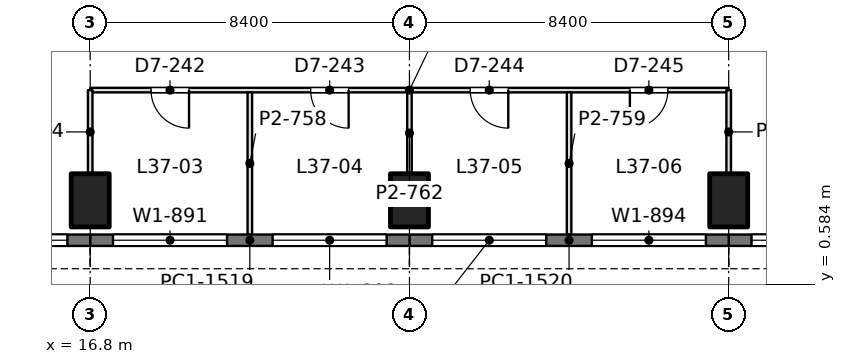
"""IFC4 building model, lengths in metres.
Left out: names, types, materials, properties, quantities, classifications, styles, units other than length and angle.
Written with IfcOpenShell. Run it as: python <this file> out.ifc"""

import sys

from ifc_helpers import new_model, si_unit, direction, frame, frame_2d, origin, origin_2d, place, context, subcontext, project, spatial, rectangle, extrude, element, fill, save


model = new_model("IFC4")
c1 = context("Model", 3, precision=1e-05, world=origin(), true_north=direction((0.0, 1.0)))
c2 = subcontext(c1, "Body", "Model", "MODEL_VIEW")
j1 = project(units=[si_unit("LENGTHUNIT", "METRE"), si_unit("PLANEANGLEUNIT", "RADIAN")], contexts=[c1])
p1 = place(None, origin())
s1 = spatial("IfcSite", under=j1, at=p1, CompositionType="ELEMENT")
p2 = place(p1, origin())
s2 = spatial("IfcBuilding", under=s1, at=p2, CompositionType="ELEMENT")
p3 = place(p2, frame((0.0, 0.0, 163.8)))
s3 = spatial("IfcBuildingStorey", under=s2, at=p3, CompositionType="ELEMENT", Elevation=163.8)
for number, where, z_axis, x_axis in (
    (1, (16.8, 2.8, 0.0), (0.0, 0.0, 1.0), (1.0, 0.0, 0.0)),
    (2, (25.2, 2.8, 0.0), (0.0, 0.0, 1.0), (1.0, 0.0, 0.0)),
    (3, (33.6, 2.8, 0.0), (0.0, 0.0, 1.0), (1.0, 0.0, 0.0)),
):
    element("IfcColumn", number, at=place(p3, frame(where, z_axis=z_axis, x_axis=x_axis)), inside=s3, PredefinedType="COLUMN", context=c2, shape_type="SweptSolid", body=[
        extrude(rectangle(XDim=1.0, YDim=1.4, at=origin_2d()), origin(), (0.0, 0.0, 1.0), 4.2),
    ])
p4 = place(p3, frame((42.0, 1.75, 0.0), z_axis=(0.0, 0.0, 1.0), x_axis=(-1.0, 0.0, 0.0)))
e4 = element("IfcWall", 4, at=p4, inside=s3, PredefinedType="SOLIDWALL", context=c2, shape_type="SweptSolid", body=[
    extrude(rectangle(XDim=8.4, YDim=0.3, at=frame_2d((4.2, 0.0))), origin(), (0.0, 0.0, 1.0), 4.0),
])
p5 = place(p4, frame((0.6, 0.0, 0.9)))
e5 = element("IfcOpeningElement", 5, at=p5, cuts=e4, PredefinedType="OPENING", context=c2, shape_type="SweptSolid", body=[
    extrude(rectangle(XDim=3.0, YDim=1.9, at=frame_2d((1.5, 0.95))), frame((0.0, 0.16, 0.0), z_axis=(0.0, -1.0, 0.0), x_axis=(1.0, 0.0, 0.0)), (0.0, 0.0, 1.0), 0.32),
])
p6 = place(p4, frame((4.8, 0.0, 0.9)))
e6 = element("IfcOpeningElement", 6, at=p6, cuts=e4, PredefinedType="OPENING", context=c2, shape_type="SweptSolid", body=[
    extrude(rectangle(XDim=3.0, YDim=1.9, at=frame_2d((1.5, 0.95))), frame((0.0, 0.16, 0.0), z_axis=(0.0, -1.0, 0.0), x_axis=(1.0, 0.0, 0.0)), (0.0, 0.0, 1.0), 0.32),
])
p7 = place(p3, frame((33.6, 1.75, 0.0), z_axis=(0.0, 0.0, 1.0), x_axis=(-1.0, 0.0, 0.0)))
e7 = element("IfcWall", 7, at=p7, inside=s3, PredefinedType="SOLIDWALL", context=c2, shape_type="SweptSolid", body=[
    extrude(rectangle(XDim=8.4, YDim=0.3, at=frame_2d((4.2, 0.0))), origin(), (0.0, 0.0, 1.0), 4.0),
])
p8 = place(p7, frame((0.6, 0.0, 0.9)))
e8 = element("IfcOpeningElement", 8, at=p8, cuts=e7, PredefinedType="OPENING", context=c2, shape_type="SweptSolid", body=[
    extrude(rectangle(XDim=3.0, YDim=1.9, at=frame_2d((1.5, 0.95))), frame((0.0, 0.16, 0.0), z_axis=(0.0, -1.0, 0.0), x_axis=(1.0, 0.0, 0.0)), (0.0, 0.0, 1.0), 0.32),
])
p9 = place(p7, frame((4.8, 0.0, 0.9)))
e9 = element("IfcOpeningElement", 9, at=p9, cuts=e7, PredefinedType="OPENING", context=c2, shape_type="SweptSolid", body=[
    extrude(rectangle(XDim=3.0, YDim=1.9, at=frame_2d((1.5, 0.95))), frame((0.0, 0.16, 0.0), z_axis=(0.0, -1.0, 0.0), x_axis=(1.0, 0.0, 0.0)), (0.0, 0.0, 1.0), 0.32),
])
p10 = place(p3, frame((25.2, 1.75, 0.0), z_axis=(0.0, 0.0, 1.0), x_axis=(-1.0, 0.0, 0.0)))
e10 = element("IfcWall", 10, at=p10, inside=s3, PredefinedType="SOLIDWALL", context=c2, shape_type="SweptSolid", body=[
    extrude(rectangle(XDim=8.4, YDim=0.3, at=frame_2d((4.2, 0.0))), origin(), (0.0, 0.0, 1.0), 4.0),
])
p11 = place(p10, frame((0.6, 0.0, 0.9)))
e11 = element("IfcOpeningElement", 11, at=p11, cuts=e10, PredefinedType="OPENING", context=c2, shape_type="SweptSolid", body=[
    extrude(rectangle(XDim=3.0, YDim=1.9, at=frame_2d((1.5, 0.95))), frame((0.0, 0.16, 0.0), z_axis=(0.0, -1.0, 0.0), x_axis=(1.0, 0.0, 0.0)), (0.0, 0.0, 1.0), 0.32),
])
p12 = place(p10, frame((4.8, 0.0, 0.9)))
e12 = element("IfcOpeningElement", 12, at=p12, cuts=e10, PredefinedType="OPENING", context=c2, shape_type="SweptSolid", body=[
    extrude(rectangle(XDim=3.0, YDim=1.9, at=frame_2d((1.5, 0.95))), frame((0.0, 0.16, 0.0), z_axis=(0.0, -1.0, 0.0), x_axis=(1.0, 0.0, 0.0)), (0.0, 0.0, 1.0), 0.32),
])
p13 = place(p3, frame((16.8, 1.75, 0.0), z_axis=(0.0, 0.0, 1.0), x_axis=(-1.0, 0.0, 0.0)))
e13 = element("IfcWall", 13, at=p13, inside=s3, PredefinedType="SOLIDWALL", context=c2, shape_type="SweptSolid", body=[
    extrude(rectangle(XDim=8.4, YDim=0.3, at=frame_2d((4.2, 0.0))), origin(), (0.0, 0.0, 1.0), 4.0),
])
p14 = place(p13, frame((0.6, 0.0, 0.9)))
e14 = element("IfcOpeningElement", 14, at=p14, cuts=e13, PredefinedType="OPENING", context=c2, shape_type="SweptSolid", body=[
    extrude(rectangle(XDim=3.0, YDim=1.9, at=frame_2d((1.5, 0.95))), frame((0.0, 0.16, 0.0), z_axis=(0.0, -1.0, 0.0), x_axis=(1.0, 0.0, 0.0)), (0.0, 0.0, 1.0), 0.32),
])
p15 = place(p13, frame((4.8, 0.0, 0.9)))
e15 = element("IfcOpeningElement", 15, at=p15, cuts=e13, PredefinedType="OPENING", context=c2, shape_type="SweptSolid", body=[
    extrude(rectangle(XDim=3.0, YDim=1.9, at=frame_2d((1.5, 0.95))), frame((0.0, 0.16, 0.0), z_axis=(0.0, -1.0, 0.0), x_axis=(1.0, 0.0, 0.0)), (0.0, 0.0, 1.0), 0.32),
])
p16 = place(p3, frame((16.8, 5.7, 0.0), z_axis=(0.0, 0.0, 1.0), x_axis=(1.0, 0.0, 0.0)))
e16 = element("IfcWall", 16, at=p16, inside=s3, PredefinedType="PARTITIONING", context=c2, shape_type="SweptSolid", body=[
    extrude(rectangle(XDim=16.8, YDim=0.12, at=frame_2d((8.4, 0.0))), origin(), (0.0, 0.0, 1.0), 3.3),
])
p17 = place(p16, frame((1.6, 0.0, 0.0)))
e17 = element("IfcOpeningElement", 17, at=p17, cuts=e16, PredefinedType="OPENING", context=c2, shape_type="SweptSolid", body=[
    extrude(rectangle(XDim=1.0, YDim=2.4, at=frame_2d((0.5, 1.2))), frame((0.0, 0.07, 0.0), z_axis=(0.0, -1.0, 0.0), x_axis=(1.0, 0.0, 0.0)), (0.0, 0.0, 1.0), 0.14),
])
p18 = place(p16, frame((5.8, 0.0, 0.0)))
e18 = element("IfcOpeningElement", 18, at=p18, cuts=e16, PredefinedType="OPENING", context=c2, shape_type="SweptSolid", body=[
    extrude(rectangle(XDim=1.0, YDim=2.4, at=frame_2d((0.5, 1.2))), frame((0.0, 0.07, 0.0), z_axis=(0.0, -1.0, 0.0), x_axis=(1.0, 0.0, 0.0)), (0.0, 0.0, 1.0), 0.14),
])
p19 = place(p16, frame((10.0, 0.0, 0.0)))
e19 = element("IfcOpeningElement", 19, at=p19, cuts=e16, PredefinedType="OPENING", context=c2, shape_type="SweptSolid", body=[
    extrude(rectangle(XDim=1.0, YDim=2.4, at=frame_2d((0.5, 1.2))), frame((0.0, 0.07, 0.0), z_axis=(0.0, -1.0, 0.0), x_axis=(1.0, 0.0, 0.0)), (0.0, 0.0, 1.0), 0.14),
])
p20 = place(p16, frame((14.2, 0.0, 0.0)))
e20 = element("IfcOpeningElement", 20, at=p20, cuts=e16, PredefinedType="OPENING", context=c2, shape_type="SweptSolid", body=[
    extrude(rectangle(XDim=1.0, YDim=2.4, at=frame_2d((0.5, 1.2))), frame((0.0, 0.07, 0.0), z_axis=(0.0, -1.0, 0.0), x_axis=(1.0, 0.0, 0.0)), (0.0, 0.0, 1.0), 0.14),
])
p21 = place(p3, frame((16.8, 3.499, 0.0), z_axis=(0.0, 0.0, 1.0), x_axis=(0.0, 1.0, 0.0)))
e21 = element("IfcWall", 21, at=p21, inside=s3, PredefinedType="PARTITIONING", context=c2, shape_type="SweptSolid", body=[
    extrude(rectangle(XDim=2.201, YDim=0.12, at=frame_2d((1.101, 0.0))), origin(), (0.0, 0.0, 1.0), 3.3),
])
p22 = place(p3, frame((21.0, 1.898, 0.0), z_axis=(0.0, 0.0, 1.0), x_axis=(0.0, 1.0, 0.0)))
e22 = element("IfcWall", 22, at=p22, inside=s3, PredefinedType="PARTITIONING", context=c2, shape_type="SweptSolid", body=[
    extrude(rectangle(XDim=3.744, YDim=0.12, at=frame_2d((1.872, 0.0))), origin(), (0.0, 0.0, 1.0), 3.593),
])
p23 = place(p3, frame((25.2, 3.499, 0.0), z_axis=(0.0, 0.0, 1.0), x_axis=(0.0, 1.0, 0.0)))
e23 = element("IfcWall", 23, at=p23, inside=s3, PredefinedType="PARTITIONING", context=c2, shape_type="SweptSolid", body=[
    extrude(rectangle(XDim=2.143, YDim=0.12, at=frame_2d((1.072, 0.0))), origin(), (0.0, 0.0, 1.0), 3.3),
])
p24 = place(p3, frame((29.4, 1.898, 0.0), z_axis=(0.0, 0.0, 1.0), x_axis=(0.0, 1.0, 0.0)))
e24 = element("IfcWall", 24, at=p24, inside=s3, PredefinedType="PARTITIONING", context=c2, shape_type="SweptSolid", body=[
    extrude(rectangle(XDim=3.744, YDim=0.12, at=frame_2d((1.872, 0.0))), origin(), (0.0, 0.0, 1.0), 3.593),
])
p25 = place(p3, frame((33.6, 3.499, 0.0), z_axis=(0.0, 0.0, 1.0), x_axis=(0.0, 1.0, 0.0)))
e25 = element("IfcWall", 25, at=p25, inside=s3, PredefinedType="PARTITIONING", context=c2, shape_type="SweptSolid", body=[
    extrude(rectangle(XDim=2.201, YDim=0.12, at=frame_2d((1.101, 0.0))), origin(), (0.0, 0.0, 1.0), 3.3),
])
p26 = place(p6, origin())
e26 = element("IfcWindow", 26, at=p26, inside=s3, PartitioningType="SINGLE_PANEL", PredefinedType="WINDOW", context=c2, shape_type="SweptSolid", body=[
    extrude(rectangle(XDim=3.0, YDim=1.9, at=frame_2d((1.5, 0.95))), frame((0.0, 0.03, 0.0), z_axis=(0.0, -1.0, 0.0), x_axis=(1.0, 0.0, 0.0)), (0.0, 0.0, 1.0), 0.06),
])
fill(e6, e26)
p27 = place(p8, origin())
e27 = element("IfcWindow", 27, at=p27, inside=s3, PartitioningType="SINGLE_PANEL", PredefinedType="WINDOW", context=c2, shape_type="SweptSolid", body=[
    extrude(rectangle(XDim=3.0, YDim=1.9, at=frame_2d((1.5, 0.95))), frame((0.0, 0.03, 0.0), z_axis=(0.0, -1.0, 0.0), x_axis=(1.0, 0.0, 0.0)), (0.0, 0.0, 1.0), 0.06),
])
fill(e8, e27)
p28 = place(p9, origin())
e28 = element("IfcWindow", 28, at=p28, inside=s3, PartitioningType="SINGLE_PANEL", PredefinedType="WINDOW", context=c2, shape_type="SweptSolid", body=[
    extrude(rectangle(XDim=3.0, YDim=1.9, at=frame_2d((1.5, 0.95))), frame((0.0, 0.03, 0.0), z_axis=(0.0, -1.0, 0.0), x_axis=(1.0, 0.0, 0.0)), (0.0, 0.0, 1.0), 0.06),
])
fill(e9, e28)
p29 = place(p11, origin())
e29 = element("IfcWindow", 29, at=p29, inside=s3, PartitioningType="SINGLE_PANEL", PredefinedType="WINDOW", context=c2, shape_type="SweptSolid", body=[
    extrude(rectangle(XDim=3.0, YDim=1.9, at=frame_2d((1.5, 0.95))), frame((0.0, 0.03, 0.0), z_axis=(0.0, -1.0, 0.0), x_axis=(1.0, 0.0, 0.0)), (0.0, 0.0, 1.0), 0.06),
])
fill(e11, e29)
p30 = place(p12, origin())
e30 = element("IfcWindow", 30, at=p30, inside=s3, PartitioningType="SINGLE_PANEL", PredefinedType="WINDOW", context=c2, shape_type="SweptSolid", body=[
    extrude(rectangle(XDim=3.0, YDim=1.9, at=frame_2d((1.5, 0.95))), frame((0.0, 0.03, 0.0), z_axis=(0.0, -1.0, 0.0), x_axis=(1.0, 0.0, 0.0)), (0.0, 0.0, 1.0), 0.06),
])
fill(e12, e30)
p31 = place(p14, origin())
e31 = element("IfcWindow", 31, at=p31, inside=s3, PartitioningType="SINGLE_PANEL", PredefinedType="WINDOW", context=c2, shape_type="SweptSolid", body=[
    extrude(rectangle(XDim=3.0, YDim=1.9, at=frame_2d((1.5, 0.95))), frame((0.0, 0.03, 0.0), z_axis=(0.0, -1.0, 0.0), x_axis=(1.0, 0.0, 0.0)), (0.0, 0.0, 1.0), 0.06),
])
fill(e14, e31)
p32 = place(p17, frame((1.0, 0.0, 0.0), z_axis=(0.0, 0.0, 1.0), x_axis=(-1.0, 0.0, 0.0)))
e32 = element("IfcDoor", 32, at=p32, inside=s3, OperationType="SINGLE_SWING_LEFT", PredefinedType="DOOR", context=c2, shape_type="SweptSolid", body=[
    extrude(rectangle(XDim=1.0, YDim=2.4, at=frame_2d((0.5, 1.2))), frame((0.0, 0.025, 0.0), z_axis=(0.0, -1.0, 0.0), x_axis=(1.0, 0.0, 0.0)), (0.0, 0.0, 1.0), 0.05),
])
fill(e17, e32)
p33 = place(p18, frame((1.0, 0.0, 0.0), z_axis=(0.0, 0.0, 1.0), x_axis=(-1.0, 0.0, 0.0)))
e33 = element("IfcDoor", 33, at=p33, inside=s3, OperationType="SINGLE_SWING_LEFT", PredefinedType="DOOR", context=c2, shape_type="SweptSolid", body=[
    extrude(rectangle(XDim=1.0, YDim=2.4, at=frame_2d((0.5, 1.2))), frame((0.0, 0.025, 0.0), z_axis=(0.0, -1.0, 0.0), x_axis=(1.0, 0.0, 0.0)), (0.0, 0.0, 1.0), 0.05),
])
fill(e18, e33)
p34 = place(p19, frame((1.0, 0.0, 0.0), z_axis=(0.0, 0.0, 1.0), x_axis=(-1.0, 0.0, 0.0)))
e34 = element("IfcDoor", 34, at=p34, inside=s3, OperationType="SINGLE_SWING_LEFT", PredefinedType="DOOR", context=c2, shape_type="SweptSolid", body=[
    extrude(rectangle(XDim=1.0, YDim=2.4, at=frame_2d((0.5, 1.2))), frame((0.0, 0.025, 0.0), z_axis=(0.0, -1.0, 0.0), x_axis=(1.0, 0.0, 0.0)), (0.0, 0.0, 1.0), 0.05),
])
fill(e19, e34)
p35 = place(p20, frame((1.0, 0.0, 0.0), z_axis=(0.0, 0.0, 1.0), x_axis=(-1.0, 0.0, 0.0)))
e35 = element("IfcDoor", 35, at=p35, inside=s3, OperationType="SINGLE_SWING_RIGHT", PredefinedType="DOOR", context=c2, shape_type="SweptSolid", body=[
    extrude(rectangle(XDim=1.0, YDim=2.4, at=frame_2d((0.5, 1.2))), frame((0.0, 0.025, 0.0), z_axis=(0.0, -1.0, 0.0), x_axis=(1.0, 0.0, 0.0)), (0.0, 0.0, 1.0), 0.05),
])
fill(e20, e35)
save(model, sys.argv[1])
